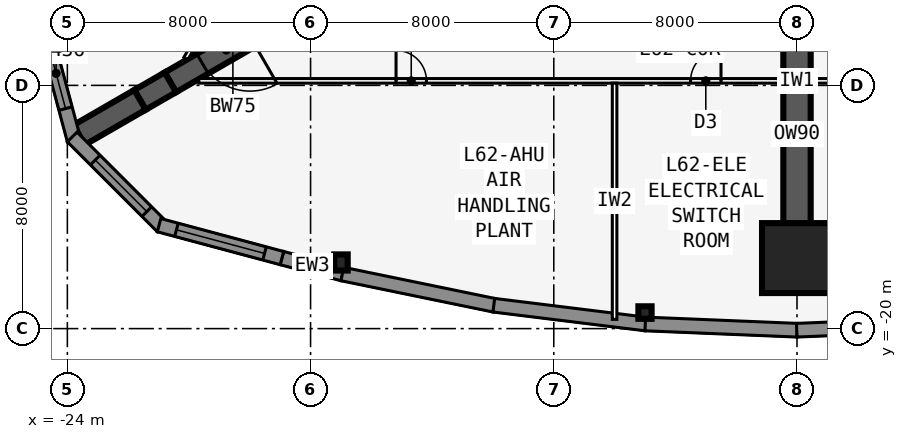
"""IFC4 building model, lengths in metres.
Left out: names, types, materials, properties, quantities, classifications, styles, units other than length and angle.
Written with IfcOpenShell. Run it as: python <this file> out.ifc"""

import sys

from ifc_helpers import new_model, si_unit, direction, frame, frame_2d, origin, origin_2d, place, context, subcontext, project, spatial, polyline, rectangle, i_section, outline, extrude, element, fill, save


model = new_model("IFC4")
c1 = context("Model", 3, precision=1e-05, world=origin(), true_north=direction((0.0, 1.0)))
c2 = subcontext(c1, "Body", "Model", "MODEL_VIEW")
j1 = project(units=[si_unit("LENGTHUNIT", "METRE"), si_unit("PLANEANGLEUNIT", "RADIAN")], contexts=[c1])
p1 = place(None, origin())
s1 = spatial("IfcSite", under=j1, at=p1, CompositionType="ELEMENT")
p2 = place(p1, origin())
s2 = spatial("IfcBuilding", under=s1, at=p2, CompositionType="ELEMENT")
p3 = place(p2, frame((0.0, 0.0, 233.3)))
s3 = spatial("IfcBuildingStorey", under=s2, at=p3, CompositionType="ELEMENT", Elevation=233.3)
p4 = place(p3, frame((-16.5, -9.526, 0.0), z_axis=(0.0, 0.0, 1.0), x_axis=(-0.866031398331, -0.499989616998, 0.0)))
e1 = element("IfcWall", 1, at=p4, inside=s3, PredefinedType="SHEAR", context=c2, shape_type="SweptSolid", body=[
    extrude(rectangle(XDim=4.746, YDim=0.75, at=frame_2d((2.373, 0.0))), origin(), (0.0, 0.0, 1.0), 6.0),
])
p5 = place(p4, frame((1.725, 0.0, 0.0)))
e2 = element("IfcOpeningElement", 2, at=p5, cuts=e1, PredefinedType="OPENING", context=c2, shape_type="SweptSolid", body=[
    extrude(rectangle(XDim=1.8, YDim=2.13, at=frame_2d((0.9, 1.065))), frame((0.0, 0.385, 0.0), z_axis=(0.0, -1.0, 0.0), x_axis=(1.0, 0.0, 0.0)), (0.0, 0.0, 1.0), 0.77),
])
p6 = place(p3, frame((-20.61, -11.899, 0.0), z_axis=(0.0, 0.0, 1.0), x_axis=(-0.866009537788, -0.500027479704, 0.0)))
e3 = element("IfcWall", 3, at=p6, inside=s3, PredefinedType="SHEAR", context=c2, shape_type="SweptSolid", body=[
    extrude(rectangle(XDim=1.155, YDim=0.75, at=frame_2d((0.577, 0.0))), origin(), (0.0, 0.0, 1.0), 6.0),
])
p7 = place(p3, frame((-21.61, -12.477, 0.0), z_axis=(0.0, 0.0, 1.0), x_axis=(-0.866055313784, -0.499948190782, 0.0)))
e4 = element("IfcWall", 4, at=p7, inside=s3, PredefinedType="SHEAR", context=c2, shape_type="SweptSolid", body=[
    extrude(rectangle(XDim=2.309, YDim=0.75, at=frame_2d((1.155, 0.0))), origin(), (0.0, 0.0, 1.0), 6.0),
])
p8 = place(p3, frame((0.0, -9.526, 0.0), z_axis=(0.0, 0.0, 1.0), x_axis=(0.0, -1.0, 0.0)))
e5 = element("IfcWall", 5, at=p8, inside=s3, PredefinedType="SHEAR", context=c2, shape_type="SweptSolid", body=[
    extrude(rectangle(XDim=8.154, YDim=0.9, at=frame_2d((4.077, 0.0))), origin(), (0.0, 0.0, 1.0), 6.0),
])
p9 = place(p3, frame((-15.0, -17.825, 0.0), z_axis=(0.0, 0.0, 1.0), x_axis=(1.0, 0.0, 0.0)))
e6 = element("IfcColumn", 6, at=p9, inside=s3, PredefinedType="COLUMN", context=c2, shape_type="SweptSolid", body=[
    extrude(i_section(OverallWidth=0.442, OverallDepth=0.531, WebThickness=0.066, FlangeThickness=0.106, at=origin_2d()), origin(), (0.0, 0.0, 1.0), 6.0),
])
p10 = place(p3, frame((-5.0, -19.472, 0.0), z_axis=(0.0, 0.0, 1.0), x_axis=(0.0, -1.0, 0.0)))
e7 = element("IfcColumn", 7, at=p10, inside=s3, PredefinedType="COLUMN", context=c2, shape_type="SweptSolid", body=[
    extrude(i_section(OverallWidth=0.411, OverallDepth=0.434, WebThickness=0.036, FlangeThickness=0.057, at=origin_2d()), origin(), (0.0, 0.0, 1.0), 6.0),
])
p11 = place(p3, frame((0.0, -17.68, 0.0), z_axis=(0.0, 0.0, 1.0), x_axis=(0.0, -1.0, 0.0)))
e8 = element("IfcColumn", 8, at=p11, inside=s3, PredefinedType="COLUMN", context=c2, shape_type="SweptSolid", body=[
    extrude(rectangle(XDim=2.3, YDim=2.3, at=origin_2d()), origin(), (0.0, 0.0, 1.0), 6.0),
])
p12 = place(p3, frame((-16.943, -17.68, 0.0), z_axis=(0.0, 0.0, 1.0), x_axis=(0.967010286052, -0.254737328772, 0.0)))
e9 = element("IfcWall", 9, at=p12, inside=s3, PredefinedType="SOLIDWALL", context=c2, shape_type="SweptSolid", body=[
    extrude(rectangle(XDim=2.068, YDim=0.45, at=frame_2d((1.034, 0.0))), origin(), (0.0, 0.0, 1.0), 5.75),
])
p13 = place(p3, frame((-14.955, -18.205, 0.0), z_axis=(0.0, 0.0, 1.0), x_axis=(0.979461488189, -0.201631329795, 0.0)))
e10 = element("IfcWall", 10, at=p13, inside=s3, PredefinedType="SOLIDWALL", context=c2, shape_type="SweptSolid", body=[
    extrude(outline(polyline([(0.0, 0.0), (5.105, 0.0), (5.105, 5.75), (0.0, 5.75), (0.0, 0.0)]), holes=[polyline([(4.502, 2.875), (4.436, 3.38), (4.241, 3.85), (3.931, 4.254), (3.527, 4.564), (3.057, 4.759), (2.552, 4.825), (2.048, 4.759), (1.577, 4.564), (1.174, 4.254), (0.864, 3.85), (0.669, 3.38), (0.602, 2.875), (0.669, 2.37), (0.864, 1.9), (1.174, 1.496), (1.577, 1.186), (2.048, 0.991), (2.552, 0.925), (3.057, 0.991), (3.527, 1.186), (3.931, 1.496), (4.241, 1.9), (4.436, 2.37), (4.502, 2.875)])]), frame((0.0, 0.225, 0.0), z_axis=(0.0, -1.0, 0.0), x_axis=(1.0, 0.0, 0.0)), (0.0, 0.0, 1.0), 0.45),
])
p14 = place(p3, frame((-9.972, -19.231, 0.0), z_axis=(0.0, 0.0, 1.0), x_axis=(0.992455772574, -0.122603178936, 0.0)))
e11 = element("IfcWall", 11, at=p14, inside=s3, PredefinedType="SOLIDWALL", context=c2, shape_type="SweptSolid", body=[
    extrude(outline(polyline([(0.0, 0.0), (5.038, 0.0), (5.038, 5.75), (0.0, 5.75), (0.0, 0.0)]), holes=[polyline([(4.419, 2.875), (4.354, 3.367), (4.165, 3.825), (3.863, 4.219), (3.469, 4.52), (3.011, 4.71), (2.519, 4.775), (2.027, 4.71), (1.569, 4.52), (1.176, 4.219), (0.874, 3.825), (0.684, 3.367), (0.619, 2.875), (0.684, 2.383), (0.874, 1.925), (1.176, 1.531), (1.569, 1.229), (2.027, 1.04), (2.519, 0.975), (3.011, 1.04), (3.469, 1.229), (3.863, 1.531), (4.165, 1.925), (4.354, 2.383), (4.419, 2.875)])]), frame((0.0, 0.225, 0.0), z_axis=(0.0, -1.0, 0.0), x_axis=(1.0, 0.0, 0.0)), (0.0, 0.0, 1.0), 0.45),
])
for number, where, z_axis, x_axis in (
    (12, (-4.991, -19.847, 0.0), (0.0, 0.0, 1.0), (0.999, -0.041, 0.0)),
    (13, (-0.009, -20.053, 0.0), (0.0, 0.0, 1.0), (0.999, 0.041, 0.0)),
):
    element("IfcWall", number, at=place(p3, frame(where, z_axis=z_axis, x_axis=x_axis)), inside=s3, PredefinedType="SOLIDWALL", context=c2, shape_type="SweptSolid", body=[
        extrude(outline(polyline([(0.0, 0.0), (5.004, 0.0), (5.004, 5.75), (0.0, 5.75), (0.0, 0.0)]), holes=[polyline([(4.402, 2.875), (4.337, 3.367), (4.148, 3.825), (3.846, 4.219), (3.452, 4.52), (2.994, 4.71), (2.502, 4.775), (2.01, 4.71), (1.552, 4.52), (1.159, 4.219), (0.857, 3.825), (0.667, 3.367), (0.602, 2.875), (0.667, 2.383), (0.857, 1.925), (1.159, 1.531), (1.552, 1.229), (2.01, 1.04), (2.502, 0.975), (2.994, 1.04), (3.452, 1.229), (3.846, 1.531), (4.148, 1.925), (4.337, 2.383), (4.402, 2.875)])]), frame((0.0, 0.225, 0.0), z_axis=(0.0, -1.0, 0.0), x_axis=(1.0, 0.0, 0.0)), (0.0, 0.0, 1.0), 0.45),
    ])
p15 = place(p3, frame((-24.865, -9.757, 0.0), z_axis=(0.0, 0.0, 1.0), x_axis=(0.258799282522, -0.96593112144, 0.0)))
e14 = element("IfcWall", 14, at=p15, inside=s3, PredefinedType="SOLIDWALL", context=c2, shape_type="SweptSolid", body=[
    extrude(outline(polyline([(4.184, 0.225), (4.125, 0.225), (3.705, 0.113), (3.675, 0.225), (0.0, 0.225), (0.0, -0.225), (4.184, -0.225), (4.184, 0.225)])), origin(), (0.0, 0.0, 1.0), 5.75),
])
p16 = place(p15, frame((0.713, 0.0, 0.9)))
e15 = element("IfcOpeningElement", 15, at=p16, cuts=e14, PredefinedType="OPENING", context=c2, shape_type="SweptSolid", body=[
    extrude(rectangle(XDim=2.4, YDim=3.6, at=frame_2d((1.2, 1.8))), frame((0.0, 0.235, 0.0), z_axis=(0.0, -1.0, 0.0), x_axis=(1.0, 0.0, 0.0)), (0.0, 0.0, 1.0), 0.47),
])
p17 = place(p3, frame((-23.841, -13.697, 0.0), z_axis=(0.0, 0.0, 1.0), x_axis=(0.707077605902, -0.707135955267, 0.0)))
e16 = element("IfcWall", 16, at=p17, inside=s3, PredefinedType="SOLIDWALL", context=c2, shape_type="SweptSolid", body=[
    extrude(outline(polyline([(4.184, 0.225), (0.509, 0.225), (0.479, 0.113), (0.059, 0.225), (0.0, 0.225), (0.0, -0.225), (4.184, -0.225), (4.184, 0.225)])), origin(), (0.0, 0.0, 1.0), 5.75),
])
p18 = place(p17, frame((1.071, 0.0, 0.9)))
e17 = element("IfcOpeningElement", 17, at=p18, cuts=e16, PredefinedType="OPENING", context=c2, shape_type="SweptSolid", body=[
    extrude(rectangle(XDim=2.4, YDim=3.6, at=frame_2d((1.2, 1.8))), frame((0.0, 0.235, 0.0), z_axis=(0.0, -1.0, 0.0), x_axis=(1.0, 0.0, 0.0)), (0.0, 0.0, 1.0), 0.47),
])
p19 = place(p3, frame((-20.983, -16.598, 0.0), z_axis=(0.0, 0.0, 1.0), x_axis=(0.965920442324, -0.258839137498, 0.0)))
e18 = element("IfcWall", 18, at=p19, inside=s3, PredefinedType="SOLIDWALL", context=c2, shape_type="SweptSolid", body=[
    extrude(rectangle(XDim=4.184, YDim=0.45, at=frame_2d((2.092, 0.0))), origin(), (0.0, 0.0, 1.0), 5.75),
])
p20 = place(p19, frame((0.592, 0.0, 0.9)))
e19 = element("IfcOpeningElement", 19, at=p20, cuts=e18, PredefinedType="OPENING", context=c2, shape_type="SweptSolid", body=[
    extrude(rectangle(XDim=3.0, YDim=3.6, at=frame_2d((1.5, 1.8))), frame((0.0, 0.235, 0.0), z_axis=(0.0, -1.0, 0.0), x_axis=(1.0, 0.0, 0.0)), (0.0, 0.0, 1.0), 0.47),
])
p21 = place(p3, frame((-19.677, -11.851, 0.0), z_axis=(0.0, 0.0, 1.0), x_axis=(1.0, 0.0, 0.0)))
e20 = element("IfcWall", 20, at=p21, inside=s3, PredefinedType="PARTITIONING", context=c2, shape_type="SweptSolid", body=[
    extrude(rectangle(XDim=39.354, YDim=0.15, at=frame_2d((19.677, 0.0))), origin(), (0.0, 0.0, 1.0), 5.75),
])
p22 = place(p21, frame((6.489, 0.0, 0.0)))
e21 = element("IfcOpeningElement", 21, at=p22, cuts=e20, PredefinedType="OPENING", context=c2, shape_type="SweptSolid", body=[
    extrude(rectangle(XDim=1.0, YDim=2.13, at=frame_2d((0.5, 1.065))), frame((0.0, 0.085, 0.0), z_axis=(0.0, -1.0, 0.0), x_axis=(1.0, 0.0, 0.0)), (0.0, 0.0, 1.0), 0.17),
])
p23 = place(p21, frame((16.177, 0.0, 0.0)))
e22 = element("IfcOpeningElement", 22, at=p23, cuts=e20, PredefinedType="OPENING", context=c2, shape_type="SweptSolid", body=[
    extrude(rectangle(XDim=1.0, YDim=2.13, at=frame_2d((0.5, 1.065))), frame((0.0, 0.085, 0.0), z_axis=(0.0, -1.0, 0.0), x_axis=(1.0, 0.0, 0.0)), (0.0, 0.0, 1.0), 0.17),
])
p24 = place(p21, frame((28.865, 0.0, 0.0)))
e23 = element("IfcOpeningElement", 23, at=p24, cuts=e20, PredefinedType="OPENING", context=c2, shape_type="SweptSolid", body=[
    extrude(rectangle(XDim=1.0, YDim=2.13, at=frame_2d((0.5, 1.065))), frame((0.0, 0.085, 0.0), z_axis=(0.0, -1.0, 0.0), x_axis=(1.0, 0.0, 0.0)), (0.0, 0.0, 1.0), 0.17),
])
p25 = place(p3, frame((-6.0, -11.926, 0.0), z_axis=(0.0, 0.0, 1.0), x_axis=(0.0, -1.0, 0.0)))
e24 = element("IfcWall", 24, at=p25, inside=s3, PredefinedType="PARTITIONING", context=c2, shape_type="SweptSolid", body=[
    extrude(rectangle(XDim=7.77, YDim=0.15, at=frame_2d((3.885, 0.0))), origin(), (0.0, 0.0, 1.0), 5.75),
])
p26 = place(p3, frame((20.102, -11.115, 0.0), z_axis=(0.0, 0.0, 1.0), x_axis=(-0.500000265775, 0.866025250339, 0.0)))
e25 = element("IfcWall", 25, at=p26, inside=s3, PredefinedType="PARTITIONING", context=c2, shape_type="SweptSolid", body=[
    extrude(rectangle(XDim=39.354, YDim=0.15, at=frame_2d((19.677, 0.0))), origin(), (0.0, 0.0, 1.0), 5.75),
])
p27 = place(p26, frame((9.489, 0.0, 0.0)))
e26 = element("IfcOpeningElement", 26, at=p27, cuts=e25, PredefinedType="OPENING", context=c2, shape_type="SweptSolid", body=[
    extrude(rectangle(XDim=1.0, YDim=2.13, at=frame_2d((0.5, 1.065))), frame((0.0, 0.085, 0.0), z_axis=(0.0, -1.0, 0.0), x_axis=(1.0, 0.0, 0.0)), (0.0, 0.0, 1.0), 0.17),
])
p28 = place(p26, frame((21.177, 0.0, 0.0)))
e27 = element("IfcOpeningElement", 27, at=p28, cuts=e25, PredefinedType="OPENING", context=c2, shape_type="SweptSolid", body=[
    extrude(rectangle(XDim=1.0, YDim=2.13, at=frame_2d((0.5, 1.065))), frame((0.0, 0.085, 0.0), z_axis=(0.0, -1.0, 0.0), x_axis=(1.0, 0.0, 0.0)), (0.0, 0.0, 1.0), 0.17),
])
p29 = place(p26, frame((30.865, 0.0, 0.0)))
e28 = element("IfcOpeningElement", 28, at=p29, cuts=e25, PredefinedType="OPENING", context=c2, shape_type="SweptSolid", body=[
    extrude(rectangle(XDim=1.0, YDim=2.13, at=frame_2d((0.5, 1.065))), frame((0.0, 0.085, 0.0), z_axis=(0.0, -1.0, 0.0), x_axis=(1.0, 0.0, 0.0)), (0.0, 0.0, 1.0), 0.17),
])
p30 = place(p3, frame((-0.425, 22.966, 0.0), z_axis=(0.0, 0.0, 1.0), x_axis=(-0.500000265775, -0.866025250339, 0.0)))
e29 = element("IfcWall", 29, at=p30, inside=s3, PredefinedType="PARTITIONING", context=c2, shape_type="SweptSolid", body=[
    extrude(rectangle(XDim=39.354, YDim=0.15, at=frame_2d((19.677, 0.0))), origin(), (0.0, 0.0, 1.0), 5.75),
])
p31 = place(p30, frame((7.489, 0.0, 0.0)))
e30 = element("IfcOpeningElement", 30, at=p31, cuts=e29, PredefinedType="OPENING", context=c2, shape_type="SweptSolid", body=[
    extrude(rectangle(XDim=1.0, YDim=2.13, at=frame_2d((0.5, 1.065))), frame((0.0, 0.085, 0.0), z_axis=(0.0, -1.0, 0.0), x_axis=(1.0, 0.0, 0.0)), (0.0, 0.0, 1.0), 0.17),
])
p32 = place(p30, frame((17.177, 0.0, 0.0)))
e31 = element("IfcOpeningElement", 31, at=p32, cuts=e29, PredefinedType="OPENING", context=c2, shape_type="SweptSolid", body=[
    extrude(rectangle(XDim=1.0, YDim=2.13, at=frame_2d((0.5, 1.065))), frame((0.0, 0.085, 0.0), z_axis=(0.0, -1.0, 0.0), x_axis=(1.0, 0.0, 0.0)), (0.0, 0.0, 1.0), 0.17),
])
p33 = place(p30, frame((28.865, 0.0, 0.0)))
e32 = element("IfcOpeningElement", 32, at=p33, cuts=e29, PredefinedType="OPENING", context=c2, shape_type="SweptSolid", body=[
    extrude(rectangle(XDim=1.0, YDim=2.13, at=frame_2d((0.5, 1.065))), frame((0.0, 0.085, 0.0), z_axis=(0.0, -1.0, 0.0), x_axis=(1.0, 0.0, 0.0)), (0.0, 0.0, 1.0), 0.17),
])
p34 = place(p16, origin())
e33 = element("IfcWindow", 33, at=p34, inside=s3, PartitioningType="SINGLE_PANEL", PredefinedType="WINDOW", context=c2, shape_type="SweptSolid", body=[
    extrude(rectangle(XDim=2.4, YDim=3.6, at=frame_2d((1.2, 1.8))), frame((0.0, 0.03, 0.0), z_axis=(0.0, -1.0, 0.0), x_axis=(1.0, 0.0, 0.0)), (0.0, 0.0, 1.0), 0.06),
])
fill(e15, e33)
p35 = place(p18, origin())
e34 = element("IfcWindow", 34, at=p35, inside=s3, PartitioningType="SINGLE_PANEL", PredefinedType="WINDOW", context=c2, shape_type="SweptSolid", body=[
    extrude(rectangle(XDim=2.4, YDim=3.6, at=frame_2d((1.2, 1.8))), frame((0.0, 0.03, 0.0), z_axis=(0.0, -1.0, 0.0), x_axis=(1.0, 0.0, 0.0)), (0.0, 0.0, 1.0), 0.06),
])
fill(e17, e34)
p36 = place(p20, origin())
e35 = element("IfcWindow", 35, at=p36, inside=s3, PartitioningType="SINGLE_PANEL", PredefinedType="WINDOW", context=c2, shape_type="SweptSolid", body=[
    extrude(rectangle(XDim=3.0, YDim=3.6, at=frame_2d((1.5, 1.8))), frame((0.0, 0.03, 0.0), z_axis=(0.0, -1.0, 0.0), x_axis=(1.0, 0.0, 0.0)), (0.0, 0.0, 1.0), 0.06),
])
fill(e19, e35)
p37 = place(p22, origin())
e36 = element("IfcDoor", 36, at=p37, inside=s3, OperationType="SINGLE_SWING_LEFT", PredefinedType="DOOR", context=c2, shape_type="SweptSolid", body=[
    extrude(rectangle(XDim=1.0, YDim=2.13, at=frame_2d((0.5, 1.065))), frame((0.0, 0.025, 0.0), z_axis=(0.0, -1.0, 0.0), x_axis=(1.0, 0.0, 0.0)), (0.0, 0.0, 1.0), 0.05),
])
fill(e21, e36)
p38 = place(p23, origin())
e37 = element("IfcDoor", 37, at=p38, inside=s3, OperationType="SINGLE_SWING_RIGHT", PredefinedType="DOOR", context=c2, shape_type="SweptSolid", body=[
    extrude(rectangle(XDim=1.0, YDim=2.13, at=frame_2d((0.5, 1.065))), frame((0.0, 0.025, 0.0), z_axis=(0.0, -1.0, 0.0), x_axis=(1.0, 0.0, 0.0)), (0.0, 0.0, 1.0), 0.05),
])
fill(e22, e37)
p39 = place(p5, origin())
e38 = element("IfcDoor", 38, at=p39, inside=s3, OperationType="DOUBLE_DOOR_DOUBLE_SWING", PredefinedType="DOOR", context=c2, shape_type="SweptSolid", body=[
    extrude(rectangle(XDim=1.8, YDim=2.13, at=frame_2d((0.9, 1.065))), frame((0.0, 0.025, 0.0), z_axis=(0.0, -1.0, 0.0), x_axis=(1.0, 0.0, 0.0)), (0.0, 0.0, 1.0), 0.05),
])
fill(e2, e38)
save(model, sys.argv[1])
